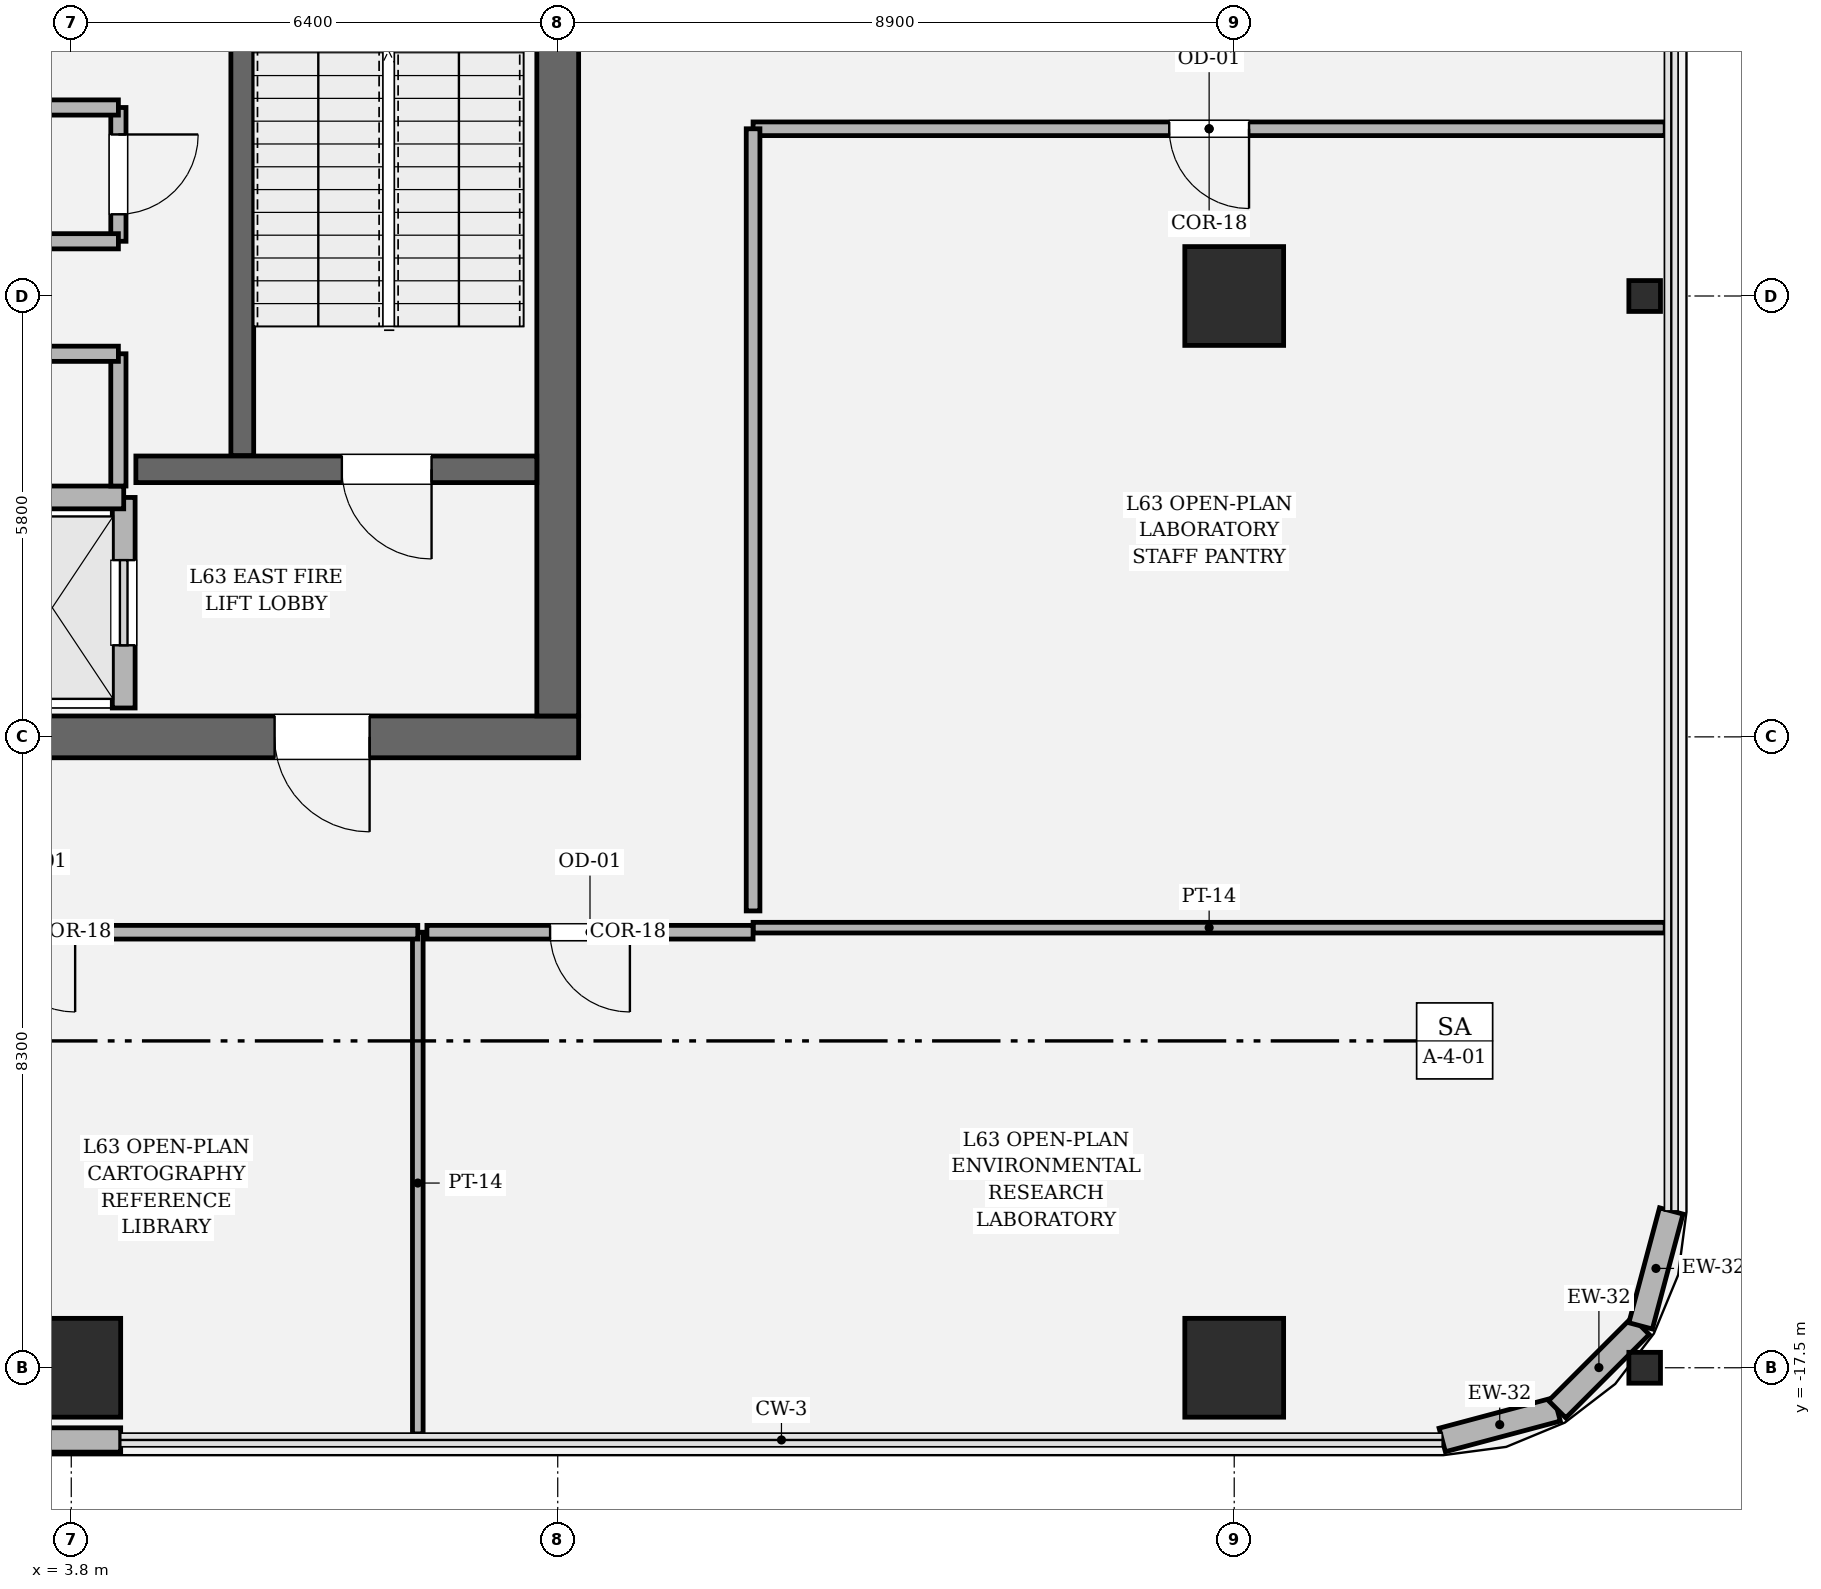
"""IFC4 building model, lengths in metres.
Left out: names, types, materials, properties, quantities, classifications, styles, units other than length and angle.
Written with IfcOpenShell. Run it as: python <this file> out.ifc"""

import sys

from ifc_helpers import new_model, si_unit, direction, frame, frame_2d, origin, origin_2d, place, context, subcontext, project, spatial, rectangle, hollow_rectangle, i_section, extrude, element, fill, save


model = new_model("IFC4")
c1 = context("Model", 3, precision=1e-05, world=origin(), true_north=direction((0.0, 1.0)))
c2 = subcontext(c1, "Body", "Model", "MODEL_VIEW")
j1 = project(units=[si_unit("LENGTHUNIT", "METRE"), si_unit("PLANEANGLEUNIT", "RADIAN")], contexts=[c1])
p1 = place(None, origin())
s1 = spatial("IfcSite", under=j1, at=p1, CompositionType="ELEMENT")
p2 = place(p1, origin())
s2 = spatial("IfcBuilding", under=s1, at=p2, CompositionType="ELEMENT")
p3 = place(p2, frame((0.0, 0.0, 267.6)))
s3 = spatial("IfcBuildingStorey", under=s2, at=p3, CompositionType="ELEMENT", Elevation=267.6)
p4 = place(p3, frame((10.475, -9.2, 0.0), z_axis=(0.0, 0.0, 1.0), x_axis=(-1.0, 0.0, 0.0)))
e1 = element("IfcWall", 1, at=p4, inside=s3, PredefinedType="SHEAR", context=c2, shape_type="SweptSolid", body=[
    extrude(rectangle(XDim=20.95, YDim=0.55, at=frame_2d((10.475, 0.0))), origin(), (0.0, 0.0, 1.0), 4.05),
])
p5 = place(p4, frame((2.75, 0.0, 0.0)))
e2 = element("IfcOpeningElement", 2, at=p5, cuts=e1, PredefinedType="OPENING", context=c2, shape_type="SweptSolid", body=[
    extrude(rectangle(XDim=1.25, YDim=2.25, at=frame_2d((0.625, 1.125))), frame((0.0, 0.285, 0.0), z_axis=(0.0, -1.0, 0.0), x_axis=(1.0, 0.0, 0.0)), (0.0, 0.0, 1.0), 0.57),
])
p6 = place(p4, frame((16.95, 0.0, 0.0)))
e3 = element("IfcOpeningElement", 3, at=p6, cuts=e1, PredefinedType="OPENING", context=c2, shape_type="SweptSolid", body=[
    extrude(rectangle(XDim=1.25, YDim=2.25, at=frame_2d((0.625, 1.125))), frame((0.0, 0.285, 0.0), z_axis=(0.0, -1.0, 0.0), x_axis=(1.0, 0.0, 0.0)), (0.0, 0.0, 1.0), 0.57),
])
p7 = place(p3, frame((10.2, 8.925, 0.0), z_axis=(0.0, 0.0, 1.0), x_axis=(0.0, -1.0, 0.0)))
e4 = element("IfcWall", 4, at=p7, inside=s3, PredefinedType="SHEAR", context=c2, shape_type="SweptSolid", body=[
    extrude(rectangle(XDim=17.85, YDim=0.55, at=frame_2d((8.925, 0.0))), origin(), (0.0, 0.0, 1.0), 4.05),
])
p8 = place(p7, frame((3.955, 0.0, 0.0)))
e5 = element("IfcOpeningElement", 5, at=p8, cuts=e4, PredefinedType="OPENING", context=c2, shape_type="SweptSolid", body=[
    extrude(rectangle(XDim=1.18, YDim=2.2, at=frame_2d((0.59, 1.1))), frame((0.0, 0.285, 0.0), z_axis=(0.0, -1.0, 0.0), x_axis=(1.0, 0.0, 0.0)), (0.0, 0.0, 1.0), 0.57),
])
p9 = place(p3, frame((6.05, 3.45, 0.0), z_axis=(0.0, 0.0, 1.0), x_axis=(0.0, -1.0, 0.0)))
e6 = element("IfcWall", 6, at=p9, inside=s3, PredefinedType="SOLIDWALL", context=c2, shape_type="SweptSolid", body=[
    extrude(rectangle(XDim=8.95, YDim=0.3, at=frame_2d((4.475, 0.0))), origin(), (0.0, 0.0, 1.0), 4.05),
])
p10 = place(p3, frame((4.65, -5.68, 0.0), z_axis=(0.0, 0.0, 1.0), x_axis=(1.0, 0.0, 0.0)))
e7 = element("IfcWall", 7, at=p10, inside=s3, PredefinedType="SOLIDWALL", context=c2, shape_type="SweptSolid", body=[
    extrude(rectangle(XDim=5.275, YDim=0.35, at=frame_2d((2.638, 0.0))), origin(), (0.0, 0.0, 1.0), 4.05),
])
p11 = place(p10, frame((2.71, 0.0, 0.0)))
e8 = element("IfcOpeningElement", 8, at=p11, cuts=e7, PredefinedType="OPENING", context=c2, shape_type="SweptSolid", body=[
    extrude(rectangle(XDim=1.18, YDim=2.2, at=frame_2d((0.59, 1.1))), frame((0.0, 0.185, 0.0), z_axis=(0.0, -1.0, 0.0), x_axis=(1.0, 0.0, 0.0)), (0.0, 0.0, 1.0), 0.37),
])
for number, where, z_axis, x_axis in (
    (9, (3.8, -17.5, 0.0), (0.0, 0.0, 1.0), (1.0, 0.0, 0.0)),
    (10, (19.1, -17.5, 0.0), (0.0, 0.0, 1.0), (1.0, 0.0, 0.0)),
    (11, (19.1, -3.4, 0.0), (0.0, 0.0, 1.0), (1.0, 0.0, 0.0)),
):
    element("IfcColumn", number, at=place(p3, frame(where, z_axis=z_axis, x_axis=x_axis)), inside=s3, PredefinedType="COLUMN", context=c2, shape_type="SweptSolid", body=[
        extrude(hollow_rectangle(XDim=1.3, YDim=1.3, WallThickness=0.038, at=origin_2d()), origin(), (0.0, 0.0, 1.0), 4.05),
    ])
for number, where, z_axis, x_axis in (
    (12, (24.5, -17.5, 0.0), (0.0, 0.0, 1.0), (0.0, 1.0, 0.0)),
    (13, (24.5, -3.4, 0.0), (0.0, 0.0, 1.0), (0.0, 1.0, 0.0)),
):
    element("IfcColumn", number, at=place(p3, frame(where, z_axis=z_axis, x_axis=x_axis)), inside=s3, PredefinedType="COLUMN", context=c2, shape_type="SweptSolid", body=[
        extrude(i_section(OverallWidth=0.406, OverallDepth=0.416, WebThickness=0.029, FlangeThickness=0.048, FilletRadius=0.018, at=origin_2d()), origin(), (0.0, 0.0, 1.0), 4.048),
    ])
p12 = place(p3, frame((-4.45, -18.45, 0.0), z_axis=(0.0, 0.0, 1.0), x_axis=(1.0, 0.0, 0.0)))
e14 = element("IfcWall", 14, at=p12, inside=s3, PredefinedType="SOLIDWALL", context=c2, shape_type="SweptSolid", body=[
    extrude(rectangle(XDim=8.9, YDim=0.32, at=frame_2d((4.45, 0.0))), origin(), (0.0, 0.0, 1.0), 3.85),
])
p13 = place(p3, frame((21.837, -18.45, 0.0), z_axis=(0.0, 0.0, 1.0), x_axis=(0.966224582397, 0.257701486942, 0.0)))
e15 = element("IfcWall", 15, at=p13, inside=s3, PredefinedType="SOLIDWALL", context=c2, shape_type="SweptSolid", body=[
    extrude(rectangle(XDim=1.565, YDim=0.32, at=frame_2d((0.783, 0.0))), origin(), (0.0, 0.0, 1.0), 3.85),
])
p14 = place(p3, frame((23.349, -18.047, 0.0), z_axis=(0.0, 0.0, 1.0), x_axis=(0.707106781187, 0.707106781187, 0.0)))
e16 = element("IfcWall", 16, at=p14, inside=s3, PredefinedType="SOLIDWALL", context=c2, shape_type="SweptSolid", body=[
    extrude(rectangle(XDim=1.552, YDim=0.32, at=frame_2d((0.776, 0.0))), origin(), (0.0, 0.0, 1.0), 2.524),
])
p15 = place(p3, frame((24.447, -16.949, 0.0), z_axis=(0.0, 0.0, 1.0), x_axis=(0.257847112249, 0.966185730957, 0.0)))
e17 = element("IfcWall", 17, at=p15, inside=s3, PredefinedType="SOLIDWALL", context=c2, shape_type="SweptSolid", body=[
    extrude(rectangle(XDim=1.565, YDim=0.32, at=frame_2d((0.783, 0.0))), origin(), (0.0, 0.0, 1.0), 2.564),
])
p16 = place(p3, frame((4.49, -8.82, 0.0), z_axis=(0.0, 0.0, 1.0), x_axis=(0.0, 1.0, 0.0)))
e18 = element("IfcWall", 18, at=p16, inside=s3, PredefinedType="SOLIDWALL", context=c2, shape_type="SweptSolid", body=[
    extrude(rectangle(XDim=2.77, YDim=0.3, at=frame_2d((1.385, 0.0))), origin(), (0.0, 0.0, 1.0), 3.85),
])
p17 = place(p16, frame((0.825, 0.0, 0.0)))
e19 = element("IfcOpeningElement", 19, at=p17, cuts=e18, PredefinedType="OPENING", context=c2, shape_type="SweptSolid", body=[
    extrude(rectangle(XDim=1.12, YDim=2.25, at=frame_2d((0.56, 1.125))), frame((0.0, 0.16, 0.0), z_axis=(0.0, -1.0, 0.0), x_axis=(1.0, 0.0, 0.0)), (0.0, 0.0, 1.0), 0.32),
])
p18 = place(p3, frame((2.61, -6.05, 0.0), z_axis=(0.0, 0.0, 1.0), x_axis=(1.0, 0.0, 0.0)))
e20 = element("IfcWall", 20, at=p18, inside=s3, PredefinedType="SOLIDWALL", context=c2, shape_type="SweptSolid", body=[
    extrude(rectangle(XDim=1.88, YDim=0.3, at=frame_2d((0.94, 0.0))), origin(), (0.0, 0.0, 1.0), 3.85),
])
p19 = place(p3, frame((4.42, -5.9, 0.0), z_axis=(0.0, 0.0, 1.0), x_axis=(0.0, 1.0, 0.0)))
e21 = element("IfcWall", 21, at=p19, inside=s3, PredefinedType="SOLIDWALL", context=c2, shape_type="SweptSolid", body=[
    extrude(rectangle(XDim=1.74, YDim=0.2, at=frame_2d((0.87, 0.0))), origin(), (0.0, 0.0, 1.0), 3.85),
])
p20 = place(p3, frame((4.42, -4.16, 0.0), z_axis=(0.0, 0.0, 1.0), x_axis=(-1.0, 0.0, 0.0)))
e22 = element("IfcWall", 22, at=p20, inside=s3, PredefinedType="SOLIDWALL", context=c2, shape_type="SweptSolid", body=[
    extrude(rectangle(XDim=2.84, YDim=0.2, at=frame_2d((1.42, 0.0))), origin(), (0.0, 0.0, 1.0), 3.85),
])
p21 = place(p20, frame((0.945, 0.0, 0.0)))
e23 = element("IfcOpeningElement", 23, at=p21, cuts=e22, PredefinedType="OPENING", context=c2, shape_type="SweptSolid", body=[
    extrude(rectangle(XDim=0.95, YDim=2.15, at=frame_2d((0.475, 1.075))), frame((0.0, 0.11, 0.0), z_axis=(0.0, -1.0, 0.0), x_axis=(1.0, 0.0, 0.0)), (0.0, 0.0, 1.0), 0.22),
])
p22 = place(p3, frame((4.42, -2.68, 0.0), z_axis=(0.0, 0.0, 1.0), x_axis=(0.0, 1.0, 0.0)))
e24 = element("IfcWall", 24, at=p22, inside=s3, PredefinedType="SOLIDWALL", context=c2, shape_type="SweptSolid", body=[
    extrude(rectangle(XDim=1.76, YDim=0.2, at=frame_2d((0.88, 0.0))), origin(), (0.0, 0.0, 1.0), 3.85),
])
p23 = place(p22, frame((0.355, 0.0, 0.0)))
e25 = element("IfcOpeningElement", 25, at=p23, cuts=e24, PredefinedType="OPENING", context=c2, shape_type="SweptSolid", body=[
    extrude(rectangle(XDim=1.05, YDim=2.2, at=frame_2d((0.525, 1.1))), frame((0.0, 0.11, 0.0), z_axis=(0.0, -1.0, 0.0), x_axis=(1.0, 0.0, 0.0)), (0.0, 0.0, 1.0), 0.22),
])
for number, where, z_axis, x_axis in (
    (26, (4.42, -0.92, 0.0), (0.0, 0.0, 1.0), (-1.0, 0.0, 0.0)),
    (27, (2.48, -2.68, 0.0), (0.0, 0.0, 1.0), (1.0, 0.0, 0.0)),
):
    element("IfcWall", number, at=place(p3, frame(where, z_axis=z_axis, x_axis=x_axis)), inside=s3, PredefinedType="SOLIDWALL", context=c2, shape_type="SweptSolid", body=[
        extrude(rectangle(XDim=1.94, YDim=0.2, at=frame_2d((0.97, 0.0))), origin(), (0.0, 0.0, 1.0), 3.85),
    ])
p24 = place(p3, frame((8.359, -11.77, 0.0), z_axis=(0.0, 0.0, 1.0), x_axis=(0.0, -1.0, 0.0)))
e28 = element("IfcWall", 28, at=p24, inside=s3, PredefinedType="PARTITIONING", context=c2, shape_type="SweptSolid", body=[
    extrude(rectangle(XDim=6.6, YDim=0.14, at=frame_2d((3.3, 0.0))), origin(), (0.0, 0.0, 1.0), 3.244),
])
p25 = place(p3, frame((-1.707, -11.77, 0.0), z_axis=(0.0, 0.0, 1.0), x_axis=(1.0, 0.0, 0.0)))
e29 = element("IfcWall", 29, at=p25, inside=s3, PredefinedType="PARTITIONING", context=c2, shape_type="SweptSolid", body=[
    extrude(rectangle(XDim=10.066, YDim=0.18, at=frame_2d((5.033, 0.0))), origin(), (0.0, 0.0, 1.0), 3.244),
])
p26 = place(p25, frame((4.508, 0.0, 0.0)))
e30 = element("IfcOpeningElement", 30, at=p26, cuts=e29, PredefinedType="OPENING", context=c2, shape_type="SweptSolid", body=[
    extrude(rectangle(XDim=1.05, YDim=2.2, at=frame_2d((0.525, 1.1))), frame((0.0, 0.1, 0.0), z_axis=(0.0, -1.0, 0.0), x_axis=(1.0, 0.0, 0.0)), (0.0, 0.0, 1.0), 0.2),
])
p27 = place(p3, frame((12.77, -11.71, 0.0), z_axis=(0.0, 0.0, 1.0), x_axis=(1.0, 0.0, 0.0)))
e31 = element("IfcWall", 31, at=p27, inside=s3, PredefinedType="PARTITIONING", context=c2, shape_type="SweptSolid", body=[
    extrude(rectangle(XDim=12.0, YDim=0.14, at=frame_2d((6.0, 0.0))), origin(), (0.0, 0.0, 1.0), 2.564),
])
p28 = place(p3, frame((8.479, -11.77, 0.0), z_axis=(0.0, 0.0, 1.0), x_axis=(1.0, 0.0, 0.0)))
e32 = element("IfcWall", 32, at=p28, inside=s3, PredefinedType="PARTITIONING", context=c2, shape_type="SweptSolid", body=[
    extrude(rectangle(XDim=4.291, YDim=0.18, at=frame_2d((2.146, 0.0))), origin(), (0.0, 0.0, 1.0), 3.244),
])
p29 = place(p28, frame((1.621, 0.0, 0.0)))
e33 = element("IfcOpeningElement", 33, at=p29, cuts=e32, PredefinedType="OPENING", context=c2, shape_type="SweptSolid", body=[
    extrude(rectangle(XDim=1.05, YDim=2.2, at=frame_2d((0.525, 1.1))), frame((0.0, 0.1, 0.0), z_axis=(0.0, -1.0, 0.0), x_axis=(1.0, 0.0, 0.0)), (0.0, 0.0, 1.0), 0.2),
])
p30 = place(p3, frame((12.77, -1.2, 0.0), z_axis=(0.0, 0.0, 1.0), x_axis=(1.0, 0.0, 0.0)))
e34 = element("IfcWall", 34, at=p30, inside=s3, PredefinedType="PARTITIONING", context=c2, shape_type="SweptSolid", body=[
    extrude(rectangle(XDim=12.0, YDim=0.18, at=frame_2d((6.0, 0.0))), origin(), (0.0, 0.0, 1.0), 2.564),
])
p31 = place(p30, frame((5.475, 0.0, 0.0)))
e35 = element("IfcOpeningElement", 35, at=p31, cuts=e34, PredefinedType="OPENING", context=c2, shape_type="SweptSolid", body=[
    extrude(rectangle(XDim=1.05, YDim=2.2, at=frame_2d((0.525, 1.1))), frame((0.0, 0.1, 0.0), z_axis=(0.0, -1.0, 0.0), x_axis=(1.0, 0.0, 0.0)), (0.0, 0.0, 1.0), 0.2),
])
p32 = place(p3, frame((12.77, -11.49, 0.0), z_axis=(0.0, 0.0, 1.0), x_axis=(0.0, 1.0, 0.0)))
e36 = element("IfcWall", 36, at=p32, inside=s3, PredefinedType="PARTITIONING", context=c2, shape_type="SweptSolid", body=[
    extrude(rectangle(XDim=10.29, YDim=0.18, at=frame_2d((5.145, 0.0))), origin(), (0.0, 0.0, 1.0), 3.244),
])
p33 = place(p11, origin())
e37 = element("IfcDoor", 37, at=p33, inside=s3, OperationType="SINGLE_SWING_RIGHT", PredefinedType="DOOR", context=c2, shape_type="SweptSolid", body=[
    extrude(rectangle(XDim=1.18, YDim=2.2, at=frame_2d((0.59, 1.1))), frame((0.0, 0.025, 0.0), z_axis=(0.0, -1.0, 0.0), x_axis=(1.0, 0.0, 0.0)), (0.0, 0.0, 1.0), 0.05),
])
fill(e8, e37)
p34 = place(p5, origin())
e38 = element("IfcDoor", 38, at=p34, inside=s3, OperationType="SINGLE_SWING_LEFT", PredefinedType="DOOR", context=c2, shape_type="SweptSolid", body=[
    extrude(rectangle(XDim=1.25, YDim=2.25, at=frame_2d((0.625, 1.125))), frame((0.0, 0.025, 0.0), z_axis=(0.0, -1.0, 0.0), x_axis=(1.0, 0.0, 0.0)), (0.0, 0.0, 1.0), 0.05),
])
fill(e2, e38)
p35 = place(p17, origin())
e39 = element("IfcDoor", 39, at=p35, inside=s3, OperationType="SLIDING_TO_RIGHT", PredefinedType="DOOR", context=c2, shape_type="SweptSolid", body=[
    extrude(rectangle(XDim=1.12, YDim=2.25, at=frame_2d((0.56, 1.125))), frame((0.0, 0.025, 0.0), z_axis=(0.0, -1.0, 0.0), x_axis=(1.0, 0.0, 0.0)), (0.0, 0.0, 1.0), 0.05),
])
fill(e19, e39)
p36 = place(p23, origin())
e40 = element("IfcDoor", 40, at=p36, inside=s3, OperationType="SINGLE_SWING_RIGHT", PredefinedType="DOOR", context=c2, shape_type="SweptSolid", body=[
    extrude(rectangle(XDim=1.05, YDim=2.2, at=frame_2d((0.525, 1.1))), frame((0.0, 0.025, 0.0), z_axis=(0.0, -1.0, 0.0), x_axis=(1.0, 0.0, 0.0)), (0.0, 0.0, 1.0), 0.05),
])
fill(e25, e40)
p37 = place(p26, origin())
e41 = element("IfcDoor", 41, at=p37, inside=s3, OperationType="SINGLE_SWING_RIGHT", PredefinedType="DOOR", context=c2, shape_type="SweptSolid", body=[
    extrude(rectangle(XDim=1.05, YDim=2.2, at=frame_2d((0.525, 1.1))), frame((0.0, 0.025, 0.0), z_axis=(0.0, -1.0, 0.0), x_axis=(1.0, 0.0, 0.0)), (0.0, 0.0, 1.0), 0.05),
])
fill(e30, e41)
p38 = place(p29, origin())
e42 = element("IfcDoor", 42, at=p38, inside=s3, OperationType="SINGLE_SWING_RIGHT", PredefinedType="DOOR", context=c2, shape_type="SweptSolid", body=[
    extrude(rectangle(XDim=1.05, YDim=2.2, at=frame_2d((0.525, 1.1))), frame((0.0, 0.025, 0.0), z_axis=(0.0, -1.0, 0.0), x_axis=(1.0, 0.0, 0.0)), (0.0, 0.0, 1.0), 0.05),
])
fill(e33, e42)
p39 = place(p31, origin())
e43 = element("IfcDoor", 43, at=p39, inside=s3, OperationType="SINGLE_SWING_RIGHT", PredefinedType="DOOR", context=c2, shape_type="SweptSolid", body=[
    extrude(rectangle(XDim=1.05, YDim=2.2, at=frame_2d((0.525, 1.1))), frame((0.0, 0.025, 0.0), z_axis=(0.0, -1.0, 0.0), x_axis=(1.0, 0.0, 0.0)), (0.0, 0.0, 1.0), 0.05),
])
fill(e35, e43)
save(model, sys.argv[1])
